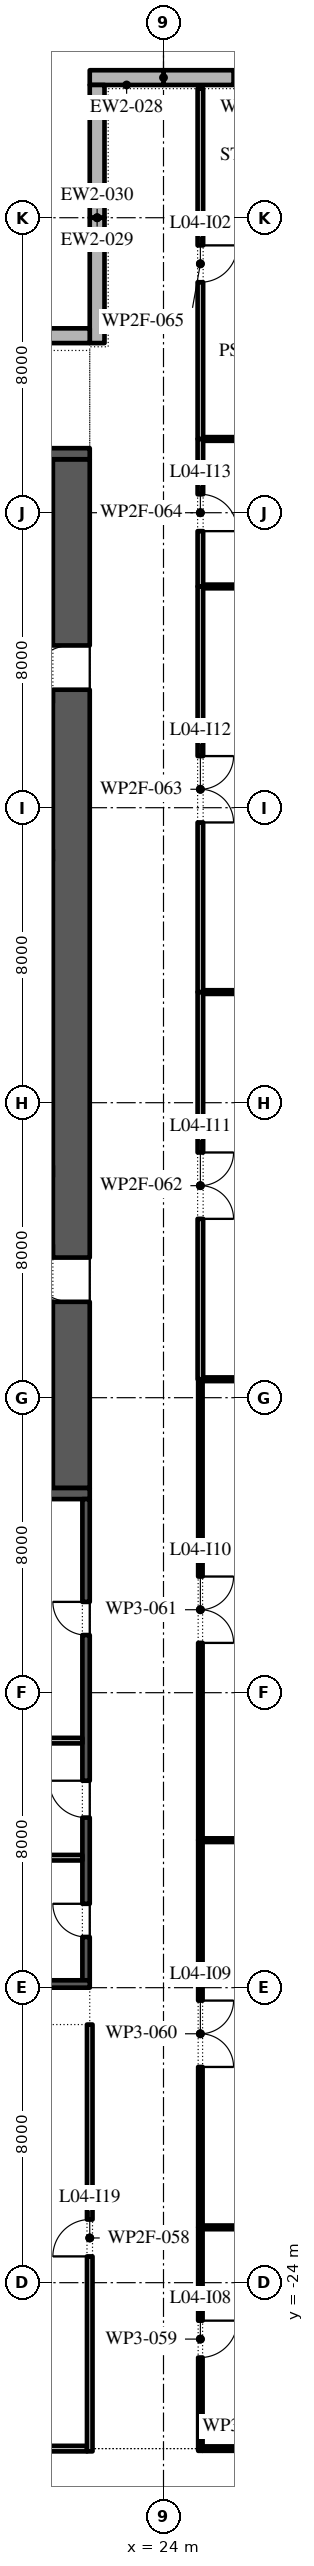
"""IFC4 building model, lengths in metres.
Left out: names, types, materials, properties, quantities, classifications, styles, units other than length and angle.
Written with IfcOpenShell. Run it as: python <this file> out.ifc"""

import sys

from ifc_helpers import new_model, si_unit, direction, frame, frame_2d, origin, place, context, subcontext, project, spatial, polyline, rectangle, outline, extrude, element, fill, save


model = new_model("IFC4")
c1 = context("Model", 3, precision=1e-05, world=origin(), true_north=direction((0.0, 1.0)))
c2 = subcontext(c1, "Body", "Model", "MODEL_VIEW")
j1 = project(units=[si_unit("LENGTHUNIT", "METRE"), si_unit("PLANEANGLEUNIT", "RADIAN")], contexts=[c1])
p1 = place(None, origin())
s1 = spatial("IfcSite", under=j1, at=p1, CompositionType="ELEMENT")
p2 = place(p1, origin())
s2 = spatial("IfcBuilding", under=s1, at=p2, CompositionType="ELEMENT")
p3 = place(p2, frame((0.0, 0.0, 24.0)))
s3 = spatial("IfcBuildingStorey", under=s2, at=p3, CompositionType="ELEMENT", Elevation=24.0)
p4 = place(p3, frame((32.0, 35.8, 0.0), z_axis=(0.0, 0.0, 1.0), x_axis=(-1.0, 0.0, 0.0)))
e1 = element("IfcWall", 1, at=p4, inside=s3, PredefinedType="STANDARD", context=c2, shape_type="SweptSolid", body=[
    extrude(rectangle(XDim=8.0, YDim=0.4, at=frame_2d((4.0, 0.0))), origin(), (0.0, 0.0, 1.0), 4.5),
])
p5 = place(p4, frame((1.9, 0.0, 0.9)))
e2 = element("IfcOpeningElement", 2, at=p5, cuts=e1, PredefinedType="OPENING", context=c2, shape_type="SweptSolid", body=[
    extrude(outline(polyline([(0.0, 0.0), (1.8, 0.0), (1.8, 1.5), (1.785, 1.729), (1.738, 1.954), (1.662, 2.17), (1.558, 2.375), (1.427, 2.563), (1.271, 2.732), (1.095, 2.879), (0.9, 3.0), (0.705, 2.879), (0.529, 2.732), (0.373, 2.563), (0.242, 2.375), (0.138, 2.17), (0.062, 1.954), (0.015, 1.729), (0.0, 1.5), (0.0, 0.0)])), frame((0.0, 0.21, 0.0), z_axis=(0.0, -1.0, 0.0), x_axis=(1.0, 0.0, 0.0)), (0.0, 0.0, 1.0), 0.42),
])
p6 = place(p4, frame((4.3, 0.0, 0.9)))
e3 = element("IfcOpeningElement", 3, at=p6, cuts=e1, PredefinedType="OPENING", context=c2, shape_type="SweptSolid", body=[
    extrude(outline(polyline([(0.0, 0.0), (1.8, 0.0), (1.8, 1.5), (1.785, 1.729), (1.738, 1.954), (1.662, 2.17), (1.558, 2.375), (1.427, 2.563), (1.271, 2.732), (1.095, 2.879), (0.9, 3.0), (0.705, 2.879), (0.529, 2.732), (0.373, 2.563), (0.242, 2.375), (0.138, 2.17), (0.062, 1.954), (0.015, 1.729), (0.0, 1.5), (0.0, 0.0)])), frame((0.0, 0.21, 0.0), z_axis=(0.0, -1.0, 0.0), x_axis=(1.0, 0.0, 0.0)), (0.0, 0.0, 1.0), 0.42),
])
p7 = place(p3, frame((24.0, 35.8, 0.0), z_axis=(0.0, 0.0, 1.0), x_axis=(-1.0, 0.0, 0.0)))
e4 = element("IfcWall", 4, at=p7, inside=s3, PredefinedType="STANDARD", context=c2, shape_type="SweptSolid", body=[
    extrude(rectangle(XDim=2.0, YDim=0.4, at=frame_2d((1.0, 0.0))), origin(), (0.0, 0.0, 1.0), 4.5),
])
p8 = place(p3, frame((22.2, 35.6, 0.0), z_axis=(0.0, 0.0, 1.0), x_axis=(0.0, -1.0, 0.0)))
e5 = element("IfcWall", 5, at=p8, inside=s3, PredefinedType="STANDARD", context=c2, shape_type="SweptSolid", body=[
    extrude(rectangle(XDim=3.6, YDim=0.4, at=frame_2d((1.8, 0.0))), origin(), (0.0, 0.0, 1.0), 4.5),
])
p9 = place(p3, frame((22.2, 32.0, 0.0), z_axis=(0.0, 0.0, 1.0), x_axis=(0.0, -1.0, 0.0)))
e6 = element("IfcWall", 6, at=p9, inside=s3, PredefinedType="STANDARD", context=c2, shape_type="SweptSolid", body=[
    extrude(rectangle(XDim=3.4, YDim=0.4, at=frame_2d((1.7, 0.0))), origin(), (0.0, 0.0, 1.0), 4.5),
])
p10 = place(p3, frame((22.0, 28.8, 0.0), z_axis=(0.0, 0.0, 1.0), x_axis=(-1.0, 0.0, 0.0)))
e7 = element("IfcWall", 7, at=p10, inside=s3, PredefinedType="STANDARD", context=c2, shape_type="SweptSolid", body=[
    extrude(rectangle(XDim=6.0, YDim=0.4, at=frame_2d((3.0, 0.0))), origin(), (0.0, 0.0, 1.0), 4.5),
])
p11 = place(p3, frame((21.5, -2.45, 0.0), z_axis=(0.0, 0.0, 1.0), x_axis=(0.0, 1.0, 0.0)))
e8 = element("IfcWall", 8, at=p11, inside=s3, PredefinedType="SHEAR", context=c2, shape_type="SweptSolid", body=[
    extrude(rectangle(XDim=27.9, YDim=1.0, at=frame_2d((13.95, 0.0))), origin(), (0.0, 0.0, 1.0), 4.5),
])
p12 = place(p11, frame((5.05, 0.0, 0.0)))
e9 = element("IfcOpeningElement", 9, at=p12, cuts=e8, PredefinedType="OPENING", context=c2, shape_type="SweptSolid", body=[
    extrude(rectangle(XDim=1.2, YDim=2.1, at=frame_2d((0.6, 1.05))), frame((0.0, 0.51, 0.0), z_axis=(0.0, -1.0, 0.0), x_axis=(1.0, 0.0, 0.0)), (0.0, 0.0, 1.0), 1.02),
])
p13 = place(p11, frame((21.65, 0.0, 0.0)))
e10 = element("IfcOpeningElement", 10, at=p13, cuts=e8, PredefinedType="OPENING", context=c2, shape_type="SweptSolid", body=[
    extrude(rectangle(XDim=1.2, YDim=2.1, at=frame_2d((0.6, 1.05))), frame((0.0, 0.51, 0.0), z_axis=(0.0, -1.0, 0.0), x_axis=(1.0, 0.0, 0.0)), (0.0, 0.0, 1.0), 1.02),
])
for number, where, z_axis, x_axis in (
    (11, (10.0, -2.6, 0.0), (0.0, 0.0, 1.0), (1.0, 0.0, 0.0)),
    (12, (10.0, 25.6, 0.0), (0.0, 0.0, 1.0), (1.0, 0.0, 0.0)),
):
    element("IfcWall", number, at=place(p3, frame(where, z_axis=z_axis, x_axis=x_axis)), inside=s3, PredefinedType="SHEAR", context=c2, shape_type="SweptSolid", body=[
        extrude(rectangle(XDim=12.0, YDim=0.3, at=frame_2d((6.0, 0.0))), origin(), (0.0, 0.0, 1.0), 4.5),
    ])
for number, where, z_axis, x_axis in (
    (13, (17.3, 4.0, 0.0), (0.0, 0.0, 1.0), (1.0, 0.0, 0.0)),
    (14, (17.3, 19.0, 0.0), (0.0, 0.0, 1.0), (1.0, 0.0, 0.0)),
):
    element("IfcWall", number, at=place(p3, frame(where, z_axis=z_axis, x_axis=x_axis)), inside=s3, PredefinedType="SHEAR", context=c2, shape_type="SweptSolid", body=[
        extrude(rectangle(XDim=3.7, YDim=0.3, at=frame_2d((1.85, 0.0))), origin(), (0.0, 0.0, 1.0), 4.5),
    ])
p14 = place(p3, frame((21.9, -15.8, 0.0), z_axis=(0.0, 0.0, 1.0), x_axis=(0.0, 1.0, 0.0)))
e15 = element("IfcWall", 15, at=p14, inside=s3, PredefinedType="SHEAR", context=c2, shape_type="SweptSolid", body=[
    extrude(rectangle(XDim=13.05, YDim=0.2, at=frame_2d((6.525, 0.0))), origin(), (0.0, 0.0, 1.0), 4.5),
])
p15 = place(p14, frame((1.175, 0.0, 0.0)))
e16 = element("IfcOpeningElement", 16, at=p15, cuts=e15, PredefinedType="OPENING", context=c2, shape_type="SweptSolid", body=[
    extrude(rectangle(XDim=0.9, YDim=2.1, at=frame_2d((0.45, 1.05))), frame((0.0, 0.11, 0.0), z_axis=(0.0, -1.0, 0.0), x_axis=(1.0, 0.0, 0.0)), (0.0, 0.0, 1.0), 0.22),
])
p16 = place(p14, frame((4.413, 0.0, 0.0)))
e17 = element("IfcOpeningElement", 17, at=p16, cuts=e15, PredefinedType="OPENING", context=c2, shape_type="SweptSolid", body=[
    extrude(rectangle(XDim=1.0, YDim=2.1, at=frame_2d((0.5, 1.05))), frame((0.0, 0.11, 0.0), z_axis=(0.0, -1.0, 0.0), x_axis=(1.0, 0.0, 0.0)), (0.0, 0.0, 1.0), 0.22),
])
p17 = place(p14, frame((9.363, 0.0, 0.0)))
e18 = element("IfcOpeningElement", 18, at=p17, cuts=e15, PredefinedType="OPENING", context=c2, shape_type="SweptSolid", body=[
    extrude(rectangle(XDim=0.9, YDim=2.1, at=frame_2d((0.45, 1.05))), frame((0.0, 0.11, 0.0), z_axis=(0.0, -1.0, 0.0), x_axis=(1.0, 0.0, 0.0)), (0.0, 0.0, 1.0), 0.22),
])
p18 = place(p3, frame((10.0, -15.9, 0.0), z_axis=(0.0, 0.0, 1.0), x_axis=(1.0, 0.0, 0.0)))
e19 = element("IfcWall", 19, at=p18, inside=s3, PredefinedType="SHEAR", context=c2, shape_type="SweptSolid", body=[
    extrude(rectangle(XDim=12.0, YDim=0.2, at=frame_2d((6.0, 0.0))), origin(), (0.0, 0.0, 1.0), 4.5),
])
for number, where, z_axis, x_axis in (
    (20, (10.2, -9.3, 0.0), (0.0, 0.0, 1.0), (1.0, 0.0, 0.0)),
    (21, (10.2, -12.475, 0.0), (0.0, 0.0, 1.0), (1.0, 0.0, 0.0)),
):
    element("IfcWall", number, at=place(p3, frame(where, z_axis=z_axis, x_axis=x_axis)), inside=s3, PredefinedType="PARTITIONING", context=c2, shape_type="SweptSolid", body=[
        extrude(rectangle(XDim=11.6, YDim=0.15, at=frame_2d((5.8, 0.0))), origin(), (0.0, 0.0, 1.0), 4.5),
    ])
p19 = place(p3, frame((10.4, -28.5, 0.0), z_axis=(0.0, 0.0, 1.0), x_axis=(1.0, 0.0, 0.0)))
e22 = element("IfcWall", 22, at=p19, inside=s3, PredefinedType="PARTITIONING", context=c2, shape_type="SweptSolid", body=[
    extrude(rectangle(XDim=11.525, YDim=0.15, at=frame_2d((5.763, 0.0))), origin(), (0.0, 0.0, 1.0), 4.5),
])
p20 = place(p3, frame((25.06, -28.5, 0.0), z_axis=(0.0, 0.0, 1.0), x_axis=(1.0, 0.0, 0.0)))
e23 = element("IfcWall", 23, at=p20, inside=s3, PredefinedType="PARTITIONING", context=c2, shape_type="SweptSolid", body=[
    extrude(rectangle(XDim=1.94, YDim=0.12, at=frame_2d((0.97, 0.0))), origin(), (0.0, 0.0, 1.0), 4.5),
])
for number, where, z_axis, x_axis in (
    (24, (25.06, -22.5, 0.0), (0.0, 0.0, 1.0), (1.0, 0.0, 0.0)),
    (25, (25.06, -12.0, 0.0), (0.0, 0.0, 1.0), (1.0, 0.0, 0.0)),
):
    element("IfcWall", number, at=place(p3, frame(where, z_axis=z_axis, x_axis=x_axis)), inside=s3, PredefinedType="PARTITIONING", context=c2, shape_type="SweptSolid", body=[
        extrude(rectangle(XDim=18.44, YDim=0.1, at=frame_2d((9.22, 0.0))), origin(), (0.0, 0.0, 1.0), 4.5),
    ])
for number, where, z_axis, x_axis in (
    (26, (25.075, 0.5, 0.0), (0.0, 0.0, 1.0), (1.0, 0.0, 0.0)),
    (27, (25.075, 11.0, 0.0), (0.0, 0.0, 1.0), (1.0, 0.0, 0.0)),
):
    element("IfcWall", number, at=place(p3, frame(where, z_axis=z_axis, x_axis=x_axis)), inside=s3, PredefinedType="PARTITIONING", context=c2, shape_type="SweptSolid", body=[
        extrude(rectangle(XDim=18.425, YDim=0.1, at=frame_2d((9.212, 0.0))), origin(), (0.0, 0.0, 1.0), 4.5),
    ])
p21 = place(p3, frame((25.075, 22.0, 0.0), z_axis=(0.0, 0.0, 1.0), x_axis=(1.0, 0.0, 0.0)))
e28 = element("IfcWall", 28, at=p21, inside=s3, PredefinedType="PARTITIONING", context=c2, shape_type="SweptSolid", body=[
    extrude(rectangle(XDim=16.425, YDim=0.1, at=frame_2d((8.212, 0.0))), origin(), (0.0, 0.0, 1.0), 4.5),
])
p22 = place(p3, frame((25.075, 26.0, 0.0), z_axis=(0.0, 0.0, 1.0), x_axis=(1.0, 0.0, 0.0)))
e29 = element("IfcWall", 29, at=p22, inside=s3, PredefinedType="PARTITIONING", context=c2, shape_type="SweptSolid", body=[
    extrude(rectangle(XDim=8.925, YDim=0.1, at=frame_2d((4.462, 0.0))), origin(), (0.0, 0.0, 1.0), 4.5),
])
p23 = place(p3, frame((22.0, -28.575, 0.0), z_axis=(0.0, 0.0, 1.0), x_axis=(0.0, 1.0, 0.0)))
e30 = element("IfcWall", 30, at=p23, inside=s3, PredefinedType="PARTITIONING", context=c2, shape_type="SweptSolid", body=[
    extrude(rectangle(XDim=11.575, YDim=0.15, at=frame_2d((5.788, 0.0))), origin(), (0.0, 0.0, 1.0), 4.5),
])
p24 = place(p23, frame((5.288, 0.0, 0.0)))
e31 = element("IfcOpeningElement", 31, at=p24, cuts=e30, PredefinedType="OPENING", context=c2, shape_type="SweptSolid", body=[
    extrude(rectangle(XDim=1.0, YDim=2.1, at=frame_2d((0.5, 1.05))), frame((0.0, 0.085, 0.0), z_axis=(0.0, -1.0, 0.0), x_axis=(1.0, 0.0, 0.0)), (0.0, 0.0, 1.0), 0.17),
])
p25 = place(p3, frame((25.0, -28.56, 0.0), z_axis=(0.0, 0.0, 1.0), x_axis=(0.0, 1.0, 0.0)))
e32 = element("IfcWall", 32, at=p25, inside=s3, PredefinedType="PARTITIONING", context=c2, shape_type="SweptSolid", body=[
    extrude(rectangle(XDim=6.06, YDim=0.12, at=frame_2d((3.03, 0.0))), origin(), (0.0, 0.0, 1.0), 4.5),
])
p26 = place(p25, frame((2.53, 0.0, 0.0)))
e33 = element("IfcOpeningElement", 33, at=p26, cuts=e32, PredefinedType="OPENING", context=c2, shape_type="SweptSolid", body=[
    extrude(rectangle(XDim=1.0, YDim=2.1, at=frame_2d((0.5, 1.05))), frame((0.0, 0.07, 0.0), z_axis=(0.0, -1.0, 0.0), x_axis=(1.0, 0.0, 0.0)), (0.0, 0.0, 1.0), 0.14),
])
p27 = place(p3, frame((25.0, -22.5, 0.0), z_axis=(0.0, 0.0, 1.0), x_axis=(0.0, 1.0, 0.0)))
e34 = element("IfcWall", 34, at=p27, inside=s3, PredefinedType="PARTITIONING", context=c2, shape_type="SweptSolid", body=[
    extrude(rectangle(XDim=10.5, YDim=0.12, at=frame_2d((5.25, 0.0))), origin(), (0.0, 0.0, 1.0), 4.5),
])
p28 = place(p27, frame((4.35, 0.0, 0.0)))
e35 = element("IfcOpeningElement", 35, at=p28, cuts=e34, PredefinedType="OPENING", context=c2, shape_type="SweptSolid", body=[
    extrude(rectangle(XDim=1.8, YDim=2.1, at=frame_2d((0.9, 1.05))), frame((0.0, 0.07, 0.0), z_axis=(0.0, -1.0, 0.0), x_axis=(1.0, 0.0, 0.0)), (0.0, 0.0, 1.0), 0.14),
])
p29 = place(p3, frame((25.0, -12.0, 0.0), z_axis=(0.0, 0.0, 1.0), x_axis=(0.0, 1.0, 0.0)))
e36 = element("IfcWall", 36, at=p29, inside=s3, PredefinedType="PARTITIONING", context=c2, shape_type="SweptSolid", body=[
    extrude(rectangle(XDim=12.5, YDim=0.12, at=frame_2d((6.25, 0.0))), origin(), (0.0, 0.0, 1.0), 4.5),
])
p30 = place(p29, frame((5.35, 0.0, 0.0)))
e37 = element("IfcOpeningElement", 37, at=p30, cuts=e36, PredefinedType="OPENING", context=c2, shape_type="SweptSolid", body=[
    extrude(rectangle(XDim=1.8, YDim=2.1, at=frame_2d((0.9, 1.05))), frame((0.0, 0.07, 0.0), z_axis=(0.0, -1.0, 0.0), x_axis=(1.0, 0.0, 0.0)), (0.0, 0.0, 1.0), 0.14),
])
p31 = place(p3, frame((25.0, 0.5, 0.0), z_axis=(0.0, 0.0, 1.0), x_axis=(0.0, 1.0, 0.0)))
e38 = element("IfcWall", 38, at=p31, inside=s3, PredefinedType="PARTITIONING", context=c2, shape_type="SweptSolid", body=[
    extrude(rectangle(XDim=10.5, YDim=0.15, at=frame_2d((5.25, 0.0))), origin(), (0.0, 0.0, 1.0), 4.5),
])
p32 = place(p31, frame((4.35, 0.0, 0.0)))
e39 = element("IfcOpeningElement", 39, at=p32, cuts=e38, PredefinedType="OPENING", context=c2, shape_type="SweptSolid", body=[
    extrude(rectangle(XDim=1.8, YDim=2.1, at=frame_2d((0.9, 1.05))), frame((0.0, 0.085, 0.0), z_axis=(0.0, -1.0, 0.0), x_axis=(1.0, 0.0, 0.0)), (0.0, 0.0, 1.0), 0.17),
])
p33 = place(p3, frame((25.0, 11.0, 0.0), z_axis=(0.0, 0.0, 1.0), x_axis=(0.0, 1.0, 0.0)))
e40 = element("IfcWall", 40, at=p33, inside=s3, PredefinedType="PARTITIONING", context=c2, shape_type="SweptSolid", body=[
    extrude(rectangle(XDim=11.0, YDim=0.15, at=frame_2d((5.5, 0.0))), origin(), (0.0, 0.0, 1.0), 4.5),
])
p34 = place(p33, frame((4.6, 0.0, 0.0)))
e41 = element("IfcOpeningElement", 41, at=p34, cuts=e40, PredefinedType="OPENING", context=c2, shape_type="SweptSolid", body=[
    extrude(rectangle(XDim=1.8, YDim=2.1, at=frame_2d((0.9, 1.05))), frame((0.0, 0.085, 0.0), z_axis=(0.0, -1.0, 0.0), x_axis=(1.0, 0.0, 0.0)), (0.0, 0.0, 1.0), 0.17),
])
p35 = place(p3, frame((25.0, 22.0, 0.0), z_axis=(0.0, 0.0, 1.0), x_axis=(0.0, 1.0, 0.0)))
e42 = element("IfcWall", 42, at=p35, inside=s3, PredefinedType="PARTITIONING", context=c2, shape_type="SweptSolid", body=[
    extrude(rectangle(XDim=4.0, YDim=0.15, at=frame_2d((2.0, 0.0))), origin(), (0.0, 0.0, 1.0), 4.5),
])
p36 = place(p35, frame((1.5, 0.0, 0.0)))
e43 = element("IfcOpeningElement", 43, at=p36, cuts=e42, PredefinedType="OPENING", context=c2, shape_type="SweptSolid", body=[
    extrude(rectangle(XDim=1.0, YDim=2.1, at=frame_2d((0.5, 1.05))), frame((0.0, 0.085, 0.0), z_axis=(0.0, -1.0, 0.0), x_axis=(1.0, 0.0, 0.0)), (0.0, 0.0, 1.0), 0.17),
])
p37 = place(p3, frame((25.0, 26.0, 0.0), z_axis=(0.0, 0.0, 1.0), x_axis=(0.0, 1.0, 0.0)))
e44 = element("IfcWall", 44, at=p37, inside=s3, PredefinedType="PARTITIONING", context=c2, shape_type="SweptSolid", body=[
    extrude(rectangle(XDim=9.5, YDim=0.15, at=frame_2d((4.75, 0.0))), origin(), (0.0, 0.0, 1.0), 4.5),
])
p38 = place(p37, frame((4.25, 0.0, 0.0)))
e45 = element("IfcOpeningElement", 45, at=p38, cuts=e44, PredefinedType="OPENING", context=c2, shape_type="SweptSolid", body=[
    extrude(rectangle(XDim=1.0, YDim=2.1, at=frame_2d((0.5, 1.05))), frame((0.0, 0.085, 0.0), z_axis=(0.0, -1.0, 0.0), x_axis=(1.0, 0.0, 0.0)), (0.0, 0.0, 1.0), 0.17),
])
p39 = place(p6, origin())
e46 = element("IfcWindow", 46, at=p39, inside=s3, PartitioningType="DOUBLE_PANEL_VERTICAL", PredefinedType="WINDOW", context=c2, shape_type="SweptSolid", body=[
    extrude(outline(polyline([(0.0, 0.0), (1.8, 0.0), (1.8, 1.5), (1.785, 1.729), (1.738, 1.954), (1.662, 2.17), (1.558, 2.375), (1.427, 2.563), (1.271, 2.732), (1.095, 2.879), (0.9, 3.0), (0.705, 2.879), (0.529, 2.732), (0.373, 2.563), (0.242, 2.375), (0.138, 2.17), (0.062, 1.954), (0.015, 1.729), (0.0, 1.5), (0.0, 0.0)])), frame((0.0, 0.03, 0.0), z_axis=(0.0, -1.0, 0.0), x_axis=(1.0, 0.0, 0.0)), (0.0, 0.0, 1.0), 0.06),
])
fill(e3, e46)
p40 = place(p12, origin())
e47 = element("IfcDoor", 47, at=p40, inside=s3, OperationType="SINGLE_SWING_LEFT", PredefinedType="DOOR", context=c2, shape_type="SweptSolid", body=[
    extrude(rectangle(XDim=1.2, YDim=2.1, at=frame_2d((0.6, 1.05))), frame((0.0, 0.025, 0.0), z_axis=(0.0, -1.0, 0.0), x_axis=(1.0, 0.0, 0.0)), (0.0, 0.0, 1.0), 0.05),
])
fill(e9, e47)
p41 = place(p13, origin())
e48 = element("IfcDoor", 48, at=p41, inside=s3, OperationType="SINGLE_SWING_RIGHT", PredefinedType="DOOR", context=c2, shape_type="SweptSolid", body=[
    extrude(rectangle(XDim=1.2, YDim=2.1, at=frame_2d((0.6, 1.05))), frame((0.0, 0.025, 0.0), z_axis=(0.0, -1.0, 0.0), x_axis=(1.0, 0.0, 0.0)), (0.0, 0.0, 1.0), 0.05),
])
fill(e10, e48)
p42 = place(p15, origin())
e49 = element("IfcDoor", 49, at=p42, inside=s3, OperationType="SINGLE_SWING_LEFT", PredefinedType="DOOR", context=c2, shape_type="SweptSolid", body=[
    extrude(rectangle(XDim=0.9, YDim=2.1, at=frame_2d((0.45, 1.05))), frame((0.0, 0.1, 0.0), z_axis=(0.0, -1.0, 0.0), x_axis=(1.0, 0.0, 0.0)), (0.0, 0.0, 1.0), 0.05),
])
fill(e16, e49)
p43 = place(p16, origin())
e50 = element("IfcDoor", 50, at=p43, inside=s3, OperationType="SINGLE_SWING_LEFT", PredefinedType="DOOR", context=c2, shape_type="SweptSolid", body=[
    extrude(rectangle(XDim=1.0, YDim=2.1, at=frame_2d((0.5, 1.05))), frame((0.0, 0.1, 0.0), z_axis=(0.0, -1.0, 0.0), x_axis=(1.0, 0.0, 0.0)), (0.0, 0.0, 1.0), 0.05),
])
fill(e17, e50)
p44 = place(p17, origin())
e51 = element("IfcDoor", 51, at=p44, inside=s3, OperationType="SINGLE_SWING_LEFT", PredefinedType="DOOR", context=c2, shape_type="SweptSolid", body=[
    extrude(rectangle(XDim=0.9, YDim=2.1, at=frame_2d((0.45, 1.05))), frame((0.0, 0.1, 0.0), z_axis=(0.0, -1.0, 0.0), x_axis=(1.0, 0.0, 0.0)), (0.0, 0.0, 1.0), 0.05),
])
fill(e18, e51)
p45 = place(p38, frame((1.0, 0.0, 0.0), z_axis=(0.0, 0.0, 1.0), x_axis=(-1.0, 0.0, 0.0)))
e52 = element("IfcDoor", 52, at=p45, inside=s3, OperationType="SINGLE_SWING_RIGHT", PredefinedType="DOOR", context=c2, shape_type="SweptSolid", body=[
    extrude(rectangle(XDim=1.0, YDim=2.1, at=frame_2d((0.5, 1.05))), frame((0.0, 0.025, 0.0), z_axis=(0.0, -1.0, 0.0), x_axis=(1.0, 0.0, 0.0)), (0.0, 0.0, 1.0), 0.05),
])
fill(e45, e52)
p46 = place(p26, frame((1.0, 0.0, 0.0), z_axis=(0.0, 0.0, 1.0), x_axis=(-1.0, 0.0, 0.0)))
e53 = element("IfcDoor", 53, at=p46, inside=s3, OperationType="SINGLE_SWING_RIGHT", PredefinedType="DOOR", context=c2, shape_type="SweptSolid", body=[
    extrude(rectangle(XDim=1.0, YDim=2.1, at=frame_2d((0.5, 1.05))), frame((0.0, 0.025, 0.0), z_axis=(0.0, -1.0, 0.0), x_axis=(1.0, 0.0, 0.0)), (0.0, 0.0, 1.0), 0.05),
])
fill(e33, e53)
p47 = place(p28, frame((1.8, 0.0, 0.0), z_axis=(0.0, 0.0, 1.0), x_axis=(-1.0, 0.0, 0.0)))
e54 = element("IfcDoor", 54, at=p47, inside=s3, OperationType="SINGLE_SWING_RIGHT", PredefinedType="DOOR", context=c2, shape_type="SweptSolid", body=[
    extrude(rectangle(XDim=1.8, YDim=2.1, at=frame_2d((0.9, 1.05))), frame((0.0, 0.025, 0.0), z_axis=(0.0, -1.0, 0.0), x_axis=(1.0, 0.0, 0.0)), (0.0, 0.0, 1.0), 0.05),
])
fill(e35, e54)
p48 = place(p30, frame((1.8, 0.0, 0.0), z_axis=(0.0, 0.0, 1.0), x_axis=(-1.0, 0.0, 0.0)))
e55 = element("IfcDoor", 55, at=p48, inside=s3, OperationType="SINGLE_SWING_LEFT", PredefinedType="DOOR", context=c2, shape_type="SweptSolid", body=[
    extrude(rectangle(XDim=1.8, YDim=2.1, at=frame_2d((0.9, 1.05))), frame((0.0, 0.025, 0.0), z_axis=(0.0, -1.0, 0.0), x_axis=(1.0, 0.0, 0.0)), (0.0, 0.0, 1.0), 0.05),
])
fill(e37, e55)
p49 = place(p32, frame((1.8, 0.0, 0.0), z_axis=(0.0, 0.0, 1.0), x_axis=(-1.0, 0.0, 0.0)))
e56 = element("IfcDoor", 56, at=p49, inside=s3, OperationType="SINGLE_SWING_LEFT", PredefinedType="DOOR", context=c2, shape_type="SweptSolid", body=[
    extrude(rectangle(XDim=1.8, YDim=2.1, at=frame_2d((0.9, 1.05))), frame((0.0, 0.025, 0.0), z_axis=(0.0, -1.0, 0.0), x_axis=(1.0, 0.0, 0.0)), (0.0, 0.0, 1.0), 0.05),
])
fill(e39, e56)
p50 = place(p34, frame((1.8, 0.0, 0.0), z_axis=(0.0, 0.0, 1.0), x_axis=(-1.0, 0.0, 0.0)))
e57 = element("IfcDoor", 57, at=p50, inside=s3, OperationType="SINGLE_SWING_LEFT", PredefinedType="DOOR", context=c2, shape_type="SweptSolid", body=[
    extrude(rectangle(XDim=1.8, YDim=2.1, at=frame_2d((0.9, 1.05))), frame((0.0, 0.025, 0.0), z_axis=(0.0, -1.0, 0.0), x_axis=(1.0, 0.0, 0.0)), (0.0, 0.0, 1.0), 0.05),
])
fill(e41, e57)
p51 = place(p36, frame((1.0, 0.0, 0.0), z_axis=(0.0, 0.0, 1.0), x_axis=(-1.0, 0.0, 0.0)))
e58 = element("IfcDoor", 58, at=p51, inside=s3, OperationType="SINGLE_SWING_LEFT", PredefinedType="DOOR", context=c2, shape_type="SweptSolid", body=[
    extrude(rectangle(XDim=1.0, YDim=2.1, at=frame_2d((0.5, 1.05))), frame((0.0, 0.025, 0.0), z_axis=(0.0, -1.0, 0.0), x_axis=(1.0, 0.0, 0.0)), (0.0, 0.0, 1.0), 0.05),
])
fill(e43, e58)
p52 = place(p24, origin())
e59 = element("IfcDoor", 59, at=p52, inside=s3, OperationType="SINGLE_SWING_RIGHT", PredefinedType="DOOR", context=c2, shape_type="SweptSolid", body=[
    extrude(rectangle(XDim=1.0, YDim=2.1, at=frame_2d((0.5, 1.05))), frame((0.0, 0.025, 0.0), z_axis=(0.0, -1.0, 0.0), x_axis=(1.0, 0.0, 0.0)), (0.0, 0.0, 1.0), 0.05),
])
fill(e31, e59)
save(model, sys.argv[1])
